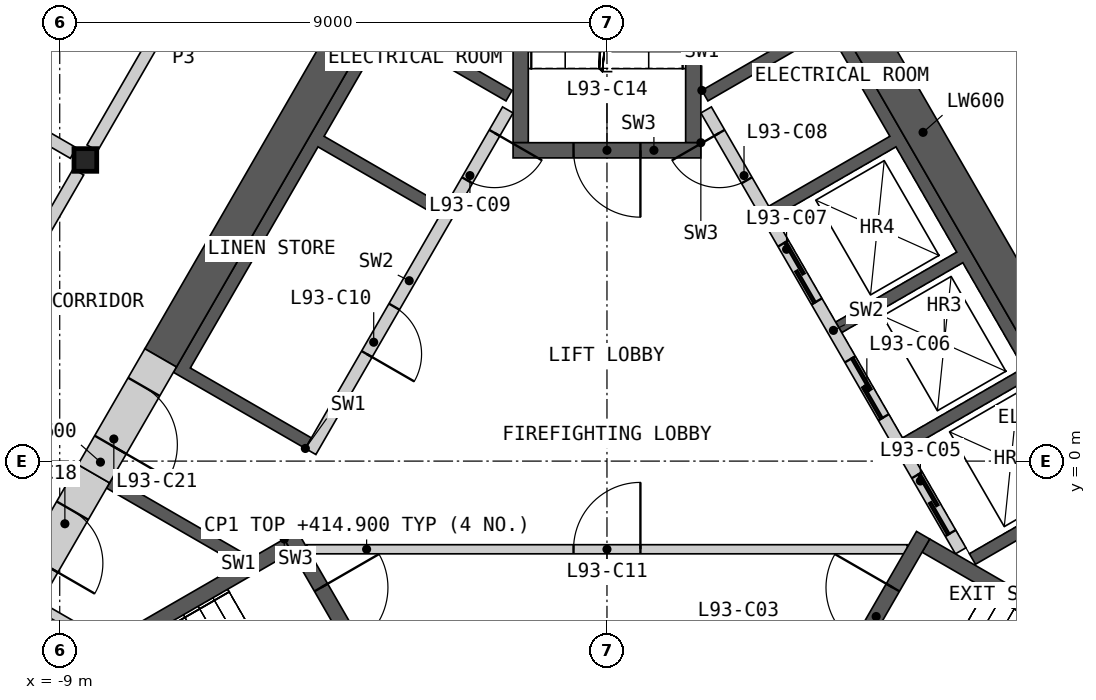
"""IFC4 building model, lengths in metres.
Left out: names, types, materials, properties, quantities, classifications, styles, units other than length and angle.
Written with IfcOpenShell. Run it as: python <this file> out.ifc"""

import sys

from ifc_helpers import new_model, si_unit, direction, frame, frame_2d, origin, origin_2d, place, context, subcontext, project, spatial, polyline, rectangle, i_section, outline, extrude, element, fill, save


model = new_model("IFC4")
c1 = context("Model", 3, precision=1e-05, world=origin(), true_north=direction((0.0, 1.0)))
c2 = subcontext(c1, "Body", "Model", "MODEL_VIEW")
j1 = project(units=[si_unit("LENGTHUNIT", "METRE"), si_unit("PLANEANGLEUNIT", "RADIAN")], contexts=[c1])
p1 = place(None, origin())
s1 = spatial("IfcSite", under=j1, at=p1, CompositionType="ELEMENT")
p2 = place(p1, origin())
s2 = spatial("IfcBuilding", under=s1, at=p2, CompositionType="ELEMENT")
p3 = place(p2, frame((0.0, 0.0, 405.2)))
s3 = spatial("IfcBuildingStorey", under=s2, at=p3, CompositionType="ELEMENT", Elevation=405.2)
p4 = place(p3, frame((-8.578, 4.953, 0.0), z_axis=(0.0, 0.0, 1.0), x_axis=(1.0, 0.0, 0.0)))
e1 = element("IfcColumn", 1, at=p4, inside=s3, PredefinedType="COLUMN", context=c2, shape_type="SweptSolid", body=[
    extrude(i_section(OverallWidth=0.374, OverallDepth=0.372, WebThickness=0.016, FlangeThickness=0.026, at=origin_2d()), origin(), (0.0, 0.0, 1.0), 10.0),
])
p5 = place(p3, origin())
e2 = element("IfcWall", 2, at=p5, inside=s3, PredefinedType="SHEAR", context=c2, shape_type="SweptSolid", body=[
    extrude(outline(polyline([(1.561, 6.097), (3.731, 7.35), (8.231, -0.444), (6.061, -1.697), (5.96, -1.524), (7.952, -0.374), (6.952, 1.358), (4.96, 0.208), (4.861, 0.381), (6.852, 1.531), (5.852, 3.263), (3.861, 2.113), (3.76, 2.287), (5.752, 3.437), (4.752, 5.169), (2.76, 4.019), (2.66, 4.192), (4.652, 5.342), (3.652, 7.074), (1.66, 5.924), (1.561, 6.097)])), origin(), (0.0, 0.0, 1.0), 9.7),
])
p6 = place(p3, frame((5.817, -1.476, 0.0), z_axis=(0.0, 0.0, 1.0), x_axis=(-0.500002616675, 0.866023893041, 0.0)))
e3 = element("IfcWall", 3, at=p6, inside=s3, PredefinedType="SOLIDWALL", context=c2, shape_type="SweptSolid", body=[
    extrude(rectangle(XDim=8.373, YDim=0.2, at=frame_2d((4.187, 0.0))), origin(), (0.0, 0.0, 1.0), 9.7),
])
p7 = place(p6, frame((0.337, 0.0, 0.0)))
e4 = element("IfcOpeningElement", 4, at=p7, cuts=e3, PredefinedType="OPENING", context=c2, shape_type="SweptSolid", body=[
    extrude(rectangle(XDim=1.1, YDim=2.1, at=frame_2d((0.55, 1.05))), frame((0.0, 0.11, 0.0), z_axis=(0.0, -1.0, 0.0), x_axis=(1.0, 0.0, 0.0)), (0.0, 0.0, 1.0), 0.22),
])
p8 = place(p6, frame((2.537, 0.0, 0.0)))
e5 = element("IfcOpeningElement", 5, at=p8, cuts=e3, PredefinedType="OPENING", context=c2, shape_type="SweptSolid", body=[
    extrude(rectangle(XDim=1.1, YDim=2.1, at=frame_2d((0.55, 1.05))), frame((0.0, 0.11, 0.0), z_axis=(0.0, -1.0, 0.0), x_axis=(1.0, 0.0, 0.0)), (0.0, 0.0, 1.0), 0.22),
])
p9 = place(p6, frame((4.737, 0.0, 0.0)))
e6 = element("IfcOpeningElement", 6, at=p9, cuts=e3, PredefinedType="OPENING", context=c2, shape_type="SweptSolid", body=[
    extrude(rectangle(XDim=1.1, YDim=2.1, at=frame_2d((0.55, 1.05))), frame((0.0, 0.11, 0.0), z_axis=(0.0, -1.0, 0.0), x_axis=(1.0, 0.0, 0.0)), (0.0, 0.0, 1.0), 0.22),
])
p10 = place(p6, frame((7.037, 0.0, 0.0)))
e7 = element("IfcOpeningElement", 7, at=p10, cuts=e3, PredefinedType="OPENING", context=c2, shape_type="SweptSolid", body=[
    extrude(rectangle(XDim=0.9, YDim=2.1, at=frame_2d((0.45, 1.05))), frame((0.0, 0.11, 0.0), z_axis=(0.0, -1.0, 0.0), x_axis=(1.0, 0.0, 0.0)), (0.0, 0.0, 1.0), 0.22),
])
p11 = place(p3, origin())
e8 = element("IfcWall", 8, at=p11, inside=s3, PredefinedType="SHEAR", context=c2, shape_type="SweptSolid", body=[
    extrude(outline(polyline([(-6.061, -1.697), (-8.231, -0.444), (-8.131, -0.271), (-5.96, -1.524), (-6.061, -1.697)])), origin(), (0.0, 0.0, 1.0), 9.7),
])
p12 = place(p3, origin())
e9 = element("IfcWall", 9, at=p12, inside=s3, PredefinedType="SHEAR", context=c2, shape_type="SweptSolid", body=[
    extrude(outline(polyline([(-4.96, 0.208), (-7.131, 1.461), (-3.731, 7.35), (-1.561, 6.097), (-1.66, 5.924), (-3.652, 7.074), (-4.652, 5.342), (-2.66, 4.192), (-2.76, 4.019), (-4.752, 5.169), (-6.852, 1.531), (-4.861, 0.381), (-4.96, 0.208)])), origin(), (0.0, 0.0, 1.0), 9.7),
])
p13 = place(p3, frame((-1.631, 5.776, 0.0), z_axis=(0.0, 0.0, 1.0), x_axis=(-0.499992876559, -0.866029516466, 0.0)))
e10 = element("IfcWall", 10, at=p13, inside=s3, PredefinedType="SOLIDWALL", context=c2, shape_type="SweptSolid", body=[
    extrude(rectangle(XDim=6.486, YDim=0.2, at=frame_2d((3.243, 0.0))), origin(), (0.0, 0.0, 1.0), 9.7),
])
p14 = place(p13, frame((0.437, 0.0, 0.0)))
e11 = element("IfcOpeningElement", 11, at=p14, cuts=e10, PredefinedType="OPENING", context=c2, shape_type="SweptSolid", body=[
    extrude(rectangle(XDim=0.9, YDim=2.1, at=frame_2d((0.45, 1.05))), frame((0.0, 0.11, 0.0), z_axis=(0.0, -1.0, 0.0), x_axis=(1.0, 0.0, 0.0)), (0.0, 0.0, 1.0), 0.22),
])
p15 = place(p13, frame((3.737, 0.0, 0.0)))
e12 = element("IfcOpeningElement", 12, at=p15, cuts=e10, PredefinedType="OPENING", context=c2, shape_type="SweptSolid", body=[
    extrude(rectangle(XDim=0.9, YDim=2.1, at=frame_2d((0.45, 1.05))), frame((0.0, 0.11, 0.0), z_axis=(0.0, -1.0, 0.0), x_axis=(1.0, 0.0, 0.0)), (0.0, 0.0, 1.0), 0.22),
])
p16 = place(p3, frame((-4.941, -1.45, 0.0), z_axis=(0.0, 0.0, 1.0), x_axis=(1.0, 0.0, 0.0)))
e13 = element("IfcWall", 13, at=p16, inside=s3, PredefinedType="PARTITIONING", context=c2, shape_type="SweptSolid", body=[
    extrude(rectangle(XDim=9.882, YDim=0.15, at=frame_2d((4.941, 0.0))), origin(), (0.0, 0.0, 1.0), 9.7),
])
p17 = place(p16, frame((4.391, 0.0, 0.0)))
e14 = element("IfcOpeningElement", 14, at=p17, cuts=e13, PredefinedType="OPENING", context=c2, shape_type="SweptSolid", body=[
    extrude(rectangle(XDim=1.1, YDim=2.1, at=frame_2d((0.55, 1.05))), frame((0.0, 0.085, 0.0), z_axis=(0.0, -1.0, 0.0), x_axis=(1.0, 0.0, 0.0)), (0.0, 0.0, 1.0), 0.17),
])
p18 = place(p3, origin())
e15 = element("IfcWall", 15, at=p18, inside=s3, PredefinedType="SHEAR", context=c2, shape_type="SweptSolid", body=[
    extrude(outline(polyline([(-5.307, -1.281), (-10.374, -4.206), (-10.032, -4.298), (-5.182, -1.498), (-5.307, -1.281)])), origin(), (0.0, 0.0, 1.0), 9.7),
])
p19 = place(p3, frame((-5.199, -1.219, 0.0), z_axis=(0.0, 0.0, 1.0), x_axis=(0.499982516597, -0.866035497597, 0.0)))
e16 = element("IfcWall", 16, at=p19, inside=s3, PredefinedType="SHEAR", context=c2, shape_type="SweptSolid", body=[
    extrude(rectangle(XDim=3.088, YDim=0.25, at=frame_2d((1.544, 0.0))), origin(), (0.0, 0.0, 1.0), 9.7),
])
p20 = place(p19, frame((0.994, 0.0, 0.0)))
e17 = element("IfcOpeningElement", 17, at=p20, cuts=e16, PredefinedType="OPENING", context=c2, shape_type="SweptSolid", body=[
    extrude(rectangle(XDim=1.1, YDim=2.1, at=frame_2d((0.55, 1.05))), frame((0.0, 0.135, 0.0), z_axis=(0.0, -1.0, 0.0), x_axis=(1.0, 0.0, 0.0)), (0.0, 0.0, 1.0), 0.27),
])
p21 = place(p3, origin())
e18 = element("IfcWall", 18, at=p21, inside=s3, PredefinedType="SHEAR", context=c2, shape_type="SweptSolid", body=[
    extrude(outline(polyline([(10.032, -4.298), (10.374, -4.206), (5.307, -1.281), (5.182, -1.498), (10.032, -4.298)])), origin(), (0.0, 0.0, 1.0), 9.7),
])
p22 = place(p3, frame((3.655, -3.893, 0.0), z_axis=(0.0, 0.0, 1.0), x_axis=(0.499982516597, 0.866035497597, 0.0)))
e19 = element("IfcWall", 19, at=p22, inside=s3, PredefinedType="SHEAR", context=c2, shape_type="SweptSolid", body=[
    extrude(rectangle(XDim=3.088, YDim=0.25, at=frame_2d((1.544, 0.0))), origin(), (0.0, 0.0, 1.0), 9.7),
])
p23 = place(p22, frame((0.994, 0.0, 0.0)))
e20 = element("IfcOpeningElement", 20, at=p23, cuts=e19, PredefinedType="OPENING", context=c2, shape_type="SweptSolid", body=[
    extrude(rectangle(XDim=1.1, YDim=2.1, at=frame_2d((0.55, 1.05))), frame((0.0, 0.135, 0.0), z_axis=(0.0, -1.0, 0.0), x_axis=(1.0, 0.0, 0.0)), (0.0, 0.0, 1.0), 0.27),
])
p24 = place(p3, origin())
e21 = element("IfcWall", 21, at=p24, inside=s3, PredefinedType="SHEAR", context=c2, shape_type="SweptSolid", body=[
    extrude(outline(polyline([(1.544, 5.237), (1.544, 11.087), (1.294, 10.837), (1.294, 5.237), (1.544, 5.237)])), origin(), (0.0, 0.0, 1.0), 9.7),
])
p25 = place(p3, origin())
e22 = element("IfcWall", 22, at=p25, inside=s3, PredefinedType="SHEAR", context=c2, shape_type="SweptSolid", body=[
    extrude(outline(polyline([(-1.294, 10.837), (-1.544, 11.087), (-1.544, 5.237), (-1.294, 5.237), (-1.294, 10.837)])), origin(), (0.0, 0.0, 1.0), 9.7),
])
p26 = place(p3, frame((1.544, 5.112, 0.0), z_axis=(0.0, 0.0, 1.0), x_axis=(-1.0, 0.0, 0.0)))
e23 = element("IfcWall", 23, at=p26, inside=s3, PredefinedType="SHEAR", context=c2, shape_type="SweptSolid", body=[
    extrude(rectangle(XDim=3.088, YDim=0.25, at=frame_2d((1.544, 0.0))), origin(), (0.0, 0.0, 1.0), 9.7),
])
p27 = place(p26, frame((0.994, 0.0, 0.0)))
e24 = element("IfcOpeningElement", 24, at=p27, cuts=e23, PredefinedType="OPENING", context=c2, shape_type="SweptSolid", body=[
    extrude(rectangle(XDim=1.1, YDim=2.1, at=frame_2d((0.55, 1.05))), frame((0.0, 0.135, 0.0), z_axis=(0.0, -1.0, 0.0), x_axis=(1.0, 0.0, 0.0)), (0.0, 0.0, 1.0), 0.27),
])
p28 = place(p3, frame((-9.35, -2.383, 0.0), z_axis=(0.0, 0.0, 1.0), x_axis=(0.866057962423, -0.499943602543, 0.0)))
e25 = element("IfcWall", 25, at=p28, inside=s3, PredefinedType="PARTITIONING", context=c2, shape_type="SweptSolid", body=[
    extrude(rectangle(XDim=1.242, YDim=0.15, at=frame_2d((0.621, 0.0))), origin(), (0.0, 0.0, 1.0), 9.7),
])
p29 = place(p3, frame((8.841, -0.902, 0.0), z_axis=(0.0, 0.0, 1.0), x_axis=(-0.499995618375, 0.866027933502, 0.0)))
e26 = element("IfcWall", 26, at=p29, inside=s3, PredefinedType="SHEAR", context=c2, shape_type="SweptSolid", body=[
    extrude(rectangle(XDim=14.571, YDim=0.6, at=frame_2d((7.285, 0.0))), origin(), (0.0, 0.0, 1.0), 9.7),
])
p30 = place(p3, frame((-3.639, 8.107, 0.0), z_axis=(0.0, 0.0, 1.0), x_axis=(-0.49999180351, -0.866030135978, 0.0)))
e27 = element("IfcWall", 27, at=p30, inside=s3, PredefinedType="SHEAR", context=c2, shape_type="SweptSolid", body=[
    extrude(rectangle(XDim=7.401, YDim=0.6, at=frame_2d((3.701, 0.0))), origin(), (0.0, 0.0, 1.0), 9.7),
])
p31 = place(p3, frame((-8.44, -0.208, 0.0), z_axis=(0.0, 0.0, 1.0), x_axis=(-0.500001951578, -0.866024277037, 0.0)))
e28 = element("IfcWall", 28, at=p31, inside=s3, PredefinedType="SHEAR", context=c2, shape_type="SweptSolid", body=[
    extrude(rectangle(XDim=2.243, YDim=0.6, at=frame_2d((1.122, 0.0))), origin(), (0.0, 0.0, 1.0), 9.7),
])
p32 = place(p31, frame((0.7, 0.0, 0.0)))
e29 = element("IfcOpeningElement", 29, at=p32, cuts=e28, PredefinedType="OPENING", context=c2, shape_type="SweptSolid", body=[
    extrude(rectangle(XDim=1.0, YDim=2.1, at=frame_2d((0.5, 1.05))), frame((0.0, 0.31, 0.0), z_axis=(0.0, -1.0, 0.0), x_axis=(1.0, 0.0, 0.0)), (0.0, 0.0, 1.0), 0.62),
])
p33 = place(p3, frame((-7.34, 1.698, 0.0), z_axis=(0.0, 0.0, 1.0), x_axis=(-0.50002983664, -0.866008176907, 0.0)))
e30 = element("IfcWall", 30, at=p33, inside=s3, PredefinedType="SHEAR", context=c2, shape_type="SweptSolid", body=[
    extrude(rectangle(XDim=2.2, YDim=0.6, at=frame_2d((1.1, 0.0))), origin(), (0.0, 0.0, 1.0), 9.7),
])
p34 = place(p33, frame((0.55, 0.0, 0.0)))
e31 = element("IfcOpeningElement", 31, at=p34, cuts=e30, PredefinedType="OPENING", context=c2, shape_type="SweptSolid", body=[
    extrude(rectangle(XDim=1.1, YDim=2.1, at=frame_2d((0.55, 1.05))), frame((0.0, 0.31, 0.0), z_axis=(0.0, -1.0, 0.0), x_axis=(1.0, 0.0, 0.0)), (0.0, 0.0, 1.0), 0.62),
])
p35 = place(p3, frame((4.403, 12.185, 0.0), z_axis=(0.0, 0.0, 1.0), x_axis=(0.499992155518, -0.866029932751, 0.0)))
e32 = element("IfcWall", 32, at=p35, inside=s3, PredefinedType="PARTITIONING", context=c2, shape_type="SweptSolid", body=[
    extrude(rectangle(XDim=8.123, YDim=0.2, at=frame_2d((4.062, 0.0))), origin(), (0.0, 0.0, 1.0), 9.7),
])
p36 = place(p35, frame((3.162, 0.0, 0.0)))
e33 = element("IfcOpeningElement", 33, at=p36, cuts=e32, PredefinedType="OPENING", context=c2, shape_type="SweptSolid", body=[
    extrude(rectangle(XDim=1.8, YDim=2.1, at=frame_2d((0.9, 1.05))), frame((0.0, 0.11, 0.0), z_axis=(0.0, -1.0, 0.0), x_axis=(1.0, 0.0, 0.0)), (0.0, 0.0, 1.0), 0.22),
])
p37 = place(p3, frame((-8.465, 5.15, 0.0), z_axis=(0.0, 0.0, 1.0), x_axis=(0.499992155518, 0.866029932751, 0.0)))
e34 = element("IfcWall", 34, at=p37, inside=s3, PredefinedType="PARTITIONING", context=c2, shape_type="SweptSolid", body=[
    extrude(rectangle(XDim=8.123, YDim=0.2, at=frame_2d((4.062, 0.0))), origin(), (0.0, 0.0, 1.0), 9.7),
])
p38 = place(p37, frame((3.162, 0.0, 0.0)))
e35 = element("IfcOpeningElement", 35, at=p38, cuts=e34, PredefinedType="OPENING", context=c2, shape_type="SweptSolid", body=[
    extrude(rectangle(XDim=1.8, YDim=2.1, at=frame_2d((0.9, 1.05))), frame((0.0, 0.11, 0.0), z_axis=(0.0, -1.0, 0.0), x_axis=(1.0, 0.0, 0.0)), (0.0, 0.0, 1.0), 0.22),
])
p39 = place(p3, frame((-12.754, -2.279, 0.0), z_axis=(0.0, 0.0, 1.0), x_axis=(0.500001682468, 0.866024432409, 0.0)))
e36 = element("IfcWall", 36, at=p39, inside=s3, PredefinedType="PARTITIONING", context=c2, shape_type="SweptSolid", body=[
    extrude(rectangle(XDim=8.124, YDim=0.2, at=frame_2d((4.062, 0.0))), origin(), (0.0, 0.0, 1.0), 9.7),
])
p40 = place(p39, frame((3.162, 0.0, 0.0)))
e37 = element("IfcOpeningElement", 37, at=p40, cuts=e36, PredefinedType="OPENING", context=c2, shape_type="SweptSolid", body=[
    extrude(rectangle(XDim=1.8, YDim=2.1, at=frame_2d((0.9, 1.05))), frame((0.0, 0.11, 0.0), z_axis=(0.0, -1.0, 0.0), x_axis=(1.0, 0.0, 0.0)), (0.0, 0.0, 1.0), 0.22),
])
p41 = place(p3, frame((-13.933, 8.044, 0.0), z_axis=(0.0, 0.0, 1.0), x_axis=(0.866024464444, -0.500001626982, 0.0)))
e38 = element("IfcWall", 38, at=p41, inside=s3, PredefinedType="PARTITIONING", context=c2, shape_type="SweptSolid", body=[
    extrude(rectangle(XDim=5.955, YDim=0.2, at=frame_2d((2.978, 0.0))), origin(), (0.0, 0.0, 1.0), 8.93),
])
p42 = place(p7, origin())
e39 = element("IfcDoor", 39, at=p42, inside=s3, OperationType="SLIDING_TO_LEFT", PredefinedType="DOOR", context=c2, shape_type="SweptSolid", body=[
    extrude(rectangle(XDim=1.1, YDim=2.1, at=frame_2d((0.55, 1.05))), frame((0.0, 0.025, 0.0), z_axis=(0.0, -1.0, 0.0), x_axis=(1.0, 0.0, 0.0)), (0.0, 0.0, 1.0), 0.05),
])
fill(e4, e39)
p43 = place(p8, origin())
e40 = element("IfcDoor", 40, at=p43, inside=s3, OperationType="SLIDING_TO_LEFT", PredefinedType="DOOR", context=c2, shape_type="SweptSolid", body=[
    extrude(rectangle(XDim=1.1, YDim=2.1, at=frame_2d((0.55, 1.05))), frame((0.0, 0.025, 0.0), z_axis=(0.0, -1.0, 0.0), x_axis=(1.0, 0.0, 0.0)), (0.0, 0.0, 1.0), 0.05),
])
fill(e5, e40)
p44 = place(p9, origin())
e41 = element("IfcDoor", 41, at=p44, inside=s3, OperationType="SLIDING_TO_LEFT", PredefinedType="DOOR", context=c2, shape_type="SweptSolid", body=[
    extrude(rectangle(XDim=1.1, YDim=2.1, at=frame_2d((0.55, 1.05))), frame((0.0, 0.025, 0.0), z_axis=(0.0, -1.0, 0.0), x_axis=(1.0, 0.0, 0.0)), (0.0, 0.0, 1.0), 0.05),
])
fill(e6, e41)
p45 = place(p10, origin())
e42 = element("IfcDoor", 42, at=p45, inside=s3, OperationType="SINGLE_SWING_RIGHT", PredefinedType="DOOR", context=c2, shape_type="SweptSolid", body=[
    extrude(rectangle(XDim=0.9, YDim=2.1, at=frame_2d((0.45, 1.05))), frame((0.0, 0.025, 0.0), z_axis=(0.0, -1.0, 0.0), x_axis=(1.0, 0.0, 0.0)), (0.0, 0.0, 1.0), 0.05),
])
fill(e7, e42)
p46 = place(p14, origin())
e43 = element("IfcDoor", 43, at=p46, inside=s3, OperationType="SINGLE_SWING_LEFT", PredefinedType="DOOR", context=c2, shape_type="SweptSolid", body=[
    extrude(rectangle(XDim=0.9, YDim=2.1, at=frame_2d((0.45, 1.05))), frame((0.0, 0.025, 0.0), z_axis=(0.0, -1.0, 0.0), x_axis=(1.0, 0.0, 0.0)), (0.0, 0.0, 1.0), 0.05),
])
fill(e11, e43)
p47 = place(p15, origin())
e44 = element("IfcDoor", 44, at=p47, inside=s3, OperationType="SINGLE_SWING_RIGHT", PredefinedType="DOOR", context=c2, shape_type="SweptSolid", body=[
    extrude(rectangle(XDim=0.9, YDim=2.1, at=frame_2d((0.45, 1.05))), frame((0.0, 0.025, 0.0), z_axis=(0.0, -1.0, 0.0), x_axis=(1.0, 0.0, 0.0)), (0.0, 0.0, 1.0), 0.05),
])
fill(e12, e44)
p48 = place(p17, origin())
e45 = element("IfcDoor", 45, at=p48, inside=s3, OperationType="SINGLE_SWING_RIGHT", PredefinedType="DOOR", context=c2, shape_type="SweptSolid", body=[
    extrude(rectangle(XDim=1.1, YDim=2.1, at=frame_2d((0.55, 1.05))), frame((0.0, 0.025, 0.0), z_axis=(0.0, -1.0, 0.0), x_axis=(1.0, 0.0, 0.0)), (0.0, 0.0, 1.0), 0.05),
])
fill(e14, e45)
p49 = place(p20, origin())
e46 = element("IfcDoor", 46, at=p49, inside=s3, OperationType="SINGLE_SWING_LEFT", PredefinedType="DOOR", context=c2, shape_type="SweptSolid", body=[
    extrude(rectangle(XDim=1.1, YDim=2.1, at=frame_2d((0.55, 1.05))), frame((0.0, 0.025, 0.0), z_axis=(0.0, -1.0, 0.0), x_axis=(1.0, 0.0, 0.0)), (0.0, 0.0, 1.0), 0.05),
])
fill(e17, e46)
p50 = place(p23, origin())
e47 = element("IfcDoor", 47, at=p50, inside=s3, OperationType="SINGLE_SWING_RIGHT", PredefinedType="DOOR", context=c2, shape_type="SweptSolid", body=[
    extrude(rectangle(XDim=1.1, YDim=2.1, at=frame_2d((0.55, 1.05))), frame((0.0, 0.025, 0.0), z_axis=(0.0, -1.0, 0.0), x_axis=(1.0, 0.0, 0.0)), (0.0, 0.0, 1.0), 0.05),
])
fill(e20, e47)
p51 = place(p27, origin())
e48 = element("IfcDoor", 48, at=p51, inside=s3, OperationType="SINGLE_SWING_LEFT", PredefinedType="DOOR", context=c2, shape_type="SweptSolid", body=[
    extrude(rectangle(XDim=1.1, YDim=2.1, at=frame_2d((0.55, 1.05))), frame((0.0, 0.025, 0.0), z_axis=(0.0, -1.0, 0.0), x_axis=(1.0, 0.0, 0.0)), (0.0, 0.0, 1.0), 0.05),
])
fill(e24, e48)
p52 = place(p32, origin())
e49 = element("IfcDoor", 49, at=p52, inside=s3, OperationType="SINGLE_SWING_RIGHT", PredefinedType="DOOR", context=c2, shape_type="SweptSolid", body=[
    extrude(rectangle(XDim=1.0, YDim=2.1, at=frame_2d((0.5, 1.05))), frame((0.0, 0.055, 0.0), z_axis=(0.0, -1.0, 0.0), x_axis=(1.0, 0.0, 0.0)), (0.0, 0.0, 1.0), 0.05),
])
fill(e29, e49)
p53 = place(p34, origin())
e50 = element("IfcDoor", 50, at=p53, inside=s3, OperationType="SINGLE_SWING_RIGHT", PredefinedType="DOOR", context=c2, shape_type="SweptSolid", body=[
    extrude(rectangle(XDim=1.1, YDim=2.1, at=frame_2d((0.55, 1.05))), frame((0.0, 0.055, 0.0), z_axis=(0.0, -1.0, 0.0), x_axis=(1.0, 0.0, 0.0)), (0.0, 0.0, 1.0), 0.05),
])
fill(e31, e50)
save(model, sys.argv[1])
